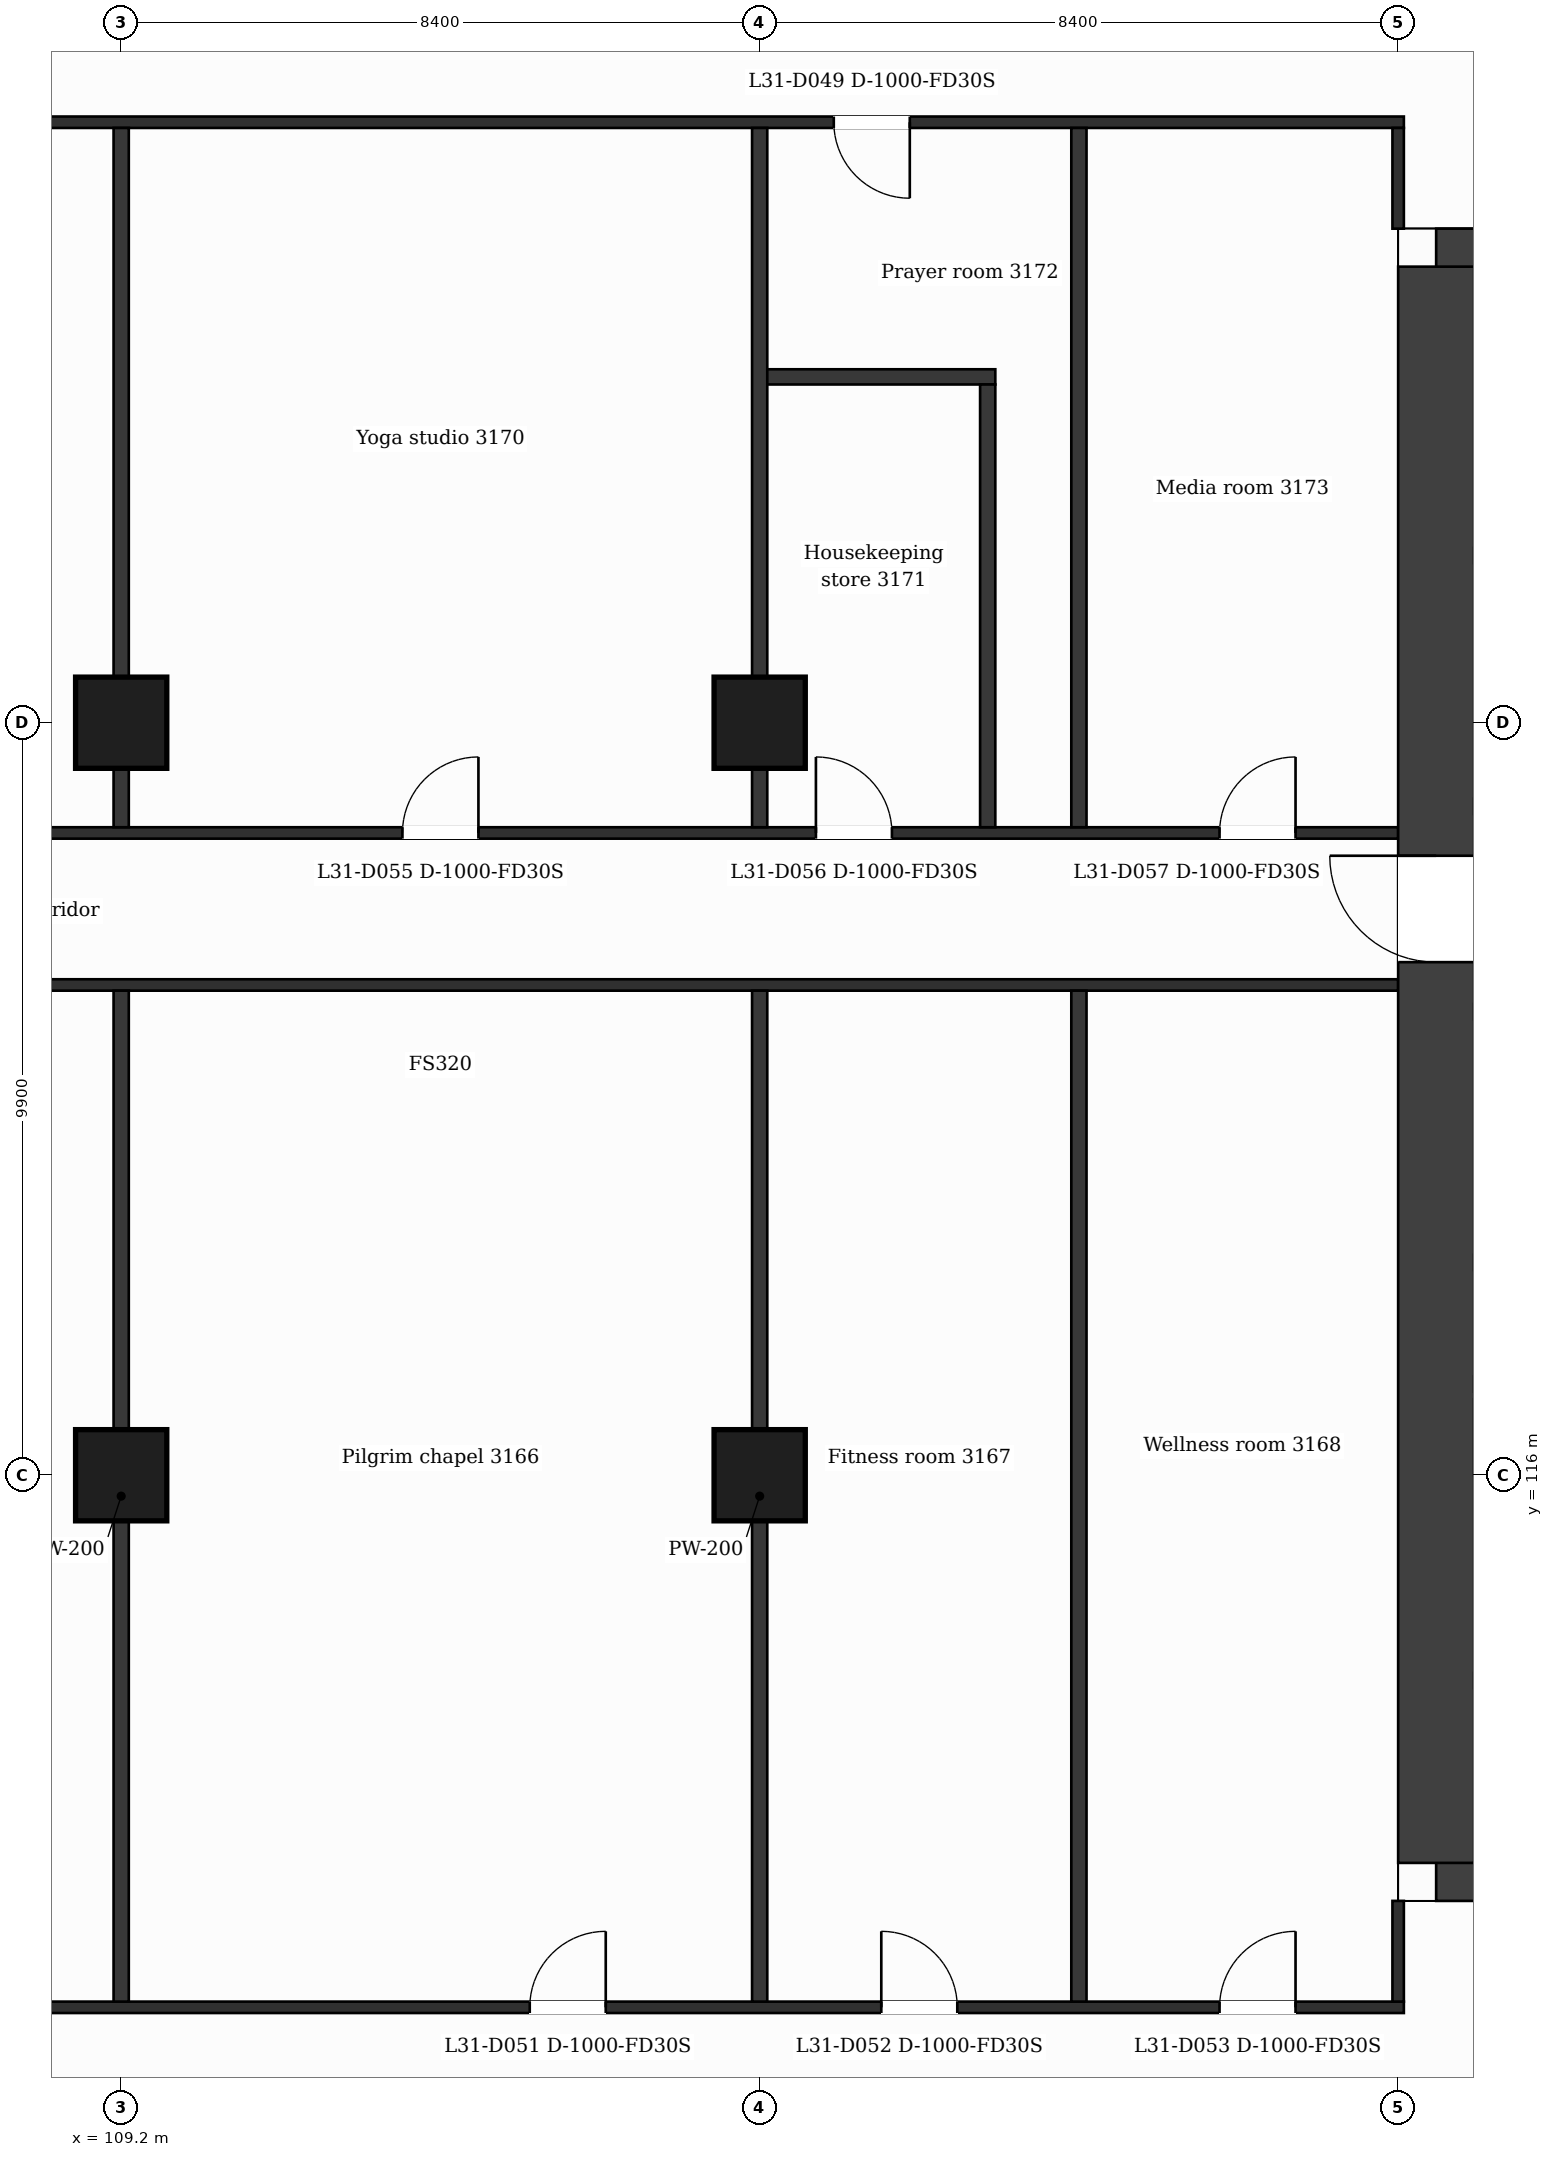
"""IFC4 building model, lengths in metres.
Left out: names, types, materials, properties, quantities, classifications, styles, units other than length and angle.
Written with IfcOpenShell. Run it as: python <this file> out.ifc"""

import sys

from ifc_helpers import new_model, si_unit, direction, frame, frame_2d, origin, origin_2d, place, context, subcontext, project, spatial, rectangle, extrude, element, fill, save


model = new_model("IFC4")
c1 = context("Model", 3, precision=1e-05, world=origin(), true_north=direction((0.0, 1.0)))
c2 = subcontext(c1, "Body", "Model", "MODEL_VIEW")
j1 = project(units=[si_unit("LENGTHUNIT", "METRE"), si_unit("PLANEANGLEUNIT", "RADIAN")], contexts=[c1])
p1 = place(None, origin())
s1 = spatial("IfcSite", under=j1, at=p1, CompositionType="ELEMENT")
p2 = place(p1, origin())
s2 = spatial("IfcBuilding", under=s1, at=p2, CompositionType="ELEMENT")
p3 = place(p2, frame((0.0, 0.0, 131.7)))
s3 = spatial("IfcBuildingStorey", under=s2, at=p3, CompositionType="ELEMENT", Elevation=131.7)
p4 = place(p3, frame((126.5, 131.9, 0.0), z_axis=(0.0, 0.0, 1.0), x_axis=(1.0, 0.0, 0.0)))
e1 = element("IfcWall", 1, at=p4, inside=s3, PredefinedType="SHEAR", context=c2, shape_type="SweptSolid", body=[
    extrude(rectangle(XDim=11.232, YDim=1.0, at=frame_2d((5.616, 0.0))), origin(), (0.0, 0.0, 1.0), 3.7),
])
p5 = place(p4, frame((3.386, 0.0, 0.0)))
e2 = element("IfcOpeningElement", 2, at=p5, cuts=e1, PredefinedType="OPENING", context=c2, shape_type="SweptSolid", body=[
    extrude(rectangle(XDim=1.2, YDim=2.1, at=frame_2d((0.6, 1.05))), frame((0.0, 0.51, 0.0), z_axis=(0.0, -1.0, 0.0), x_axis=(1.0, 0.0, 0.0)), (0.0, 0.0, 1.0), 1.02),
])
p6 = place(p3, frame((140.559, 110.9, 0.0), z_axis=(0.0, 0.0, 1.0), x_axis=(-1.0, 0.0, 0.0)))
e3 = element("IfcWall", 3, at=p6, inside=s3, PredefinedType="SHEAR", context=c2, shape_type="SweptSolid", body=[
    extrude(rectangle(XDim=14.059, YDim=1.0, at=frame_2d((7.029, 0.0))), origin(), (0.0, 0.0, 1.0), 3.7),
])
p7 = place(p6, frame((6.858, 0.0, 0.0)))
e4 = element("IfcOpeningElement", 4, at=p7, cuts=e3, PredefinedType="OPENING", context=c2, shape_type="SweptSolid", body=[
    extrude(rectangle(XDim=1.4, YDim=2.1, at=frame_2d((0.7, 1.05))), frame((0.0, 0.51, 0.0), z_axis=(0.0, -1.0, 0.0), x_axis=(1.0, 0.0, 0.0)), (0.0, 0.0, 1.0), 1.02),
])
p8 = place(p3, frame((126.5, 110.9, 0.0), z_axis=(0.0, 0.0, 1.0), x_axis=(0.0, 1.0, 0.0)))
e5 = element("IfcWall", 5, at=p8, inside=s3, PredefinedType="SHEAR", context=c2, shape_type="SweptSolid", body=[
    extrude(rectangle(XDim=21.0, YDim=1.0, at=frame_2d((10.5, 0.0))), origin(), (0.0, 0.0, 1.0), 3.7),
])
p9 = place(p8, frame((11.85, 0.0, 0.0)))
e6 = element("IfcOpeningElement", 6, at=p9, cuts=e5, PredefinedType="OPENING", context=c2, shape_type="SweptSolid", body=[
    extrude(rectangle(XDim=1.4, YDim=2.1, at=frame_2d((0.7, 1.05))), frame((0.0, 0.51, 0.0), z_axis=(0.0, -1.0, 0.0), x_axis=(1.0, 0.0, 0.0)), (0.0, 0.0, 1.0), 1.02),
])
for number, where, z_axis, x_axis in (
    (7, (109.2, 116.0, 0.0), (0.0, 0.0, 1.0), (1.0, 0.0, 0.0)),
    (8, (117.6, 116.0, 0.0), (0.0, 0.0, 1.0), (1.0, 0.0, 0.0)),
    (9, (109.2, 125.9, 0.0), (0.0, 0.0, 1.0), (1.0, 0.0, 0.0)),
    (10, (117.6, 125.9, 0.0), (0.0, 0.0, 1.0), (1.0, 0.0, 0.0)),
):
    element("IfcColumn", number, at=place(p3, frame(where, z_axis=z_axis, x_axis=x_axis)), inside=s3, PredefinedType="COLUMN", context=c2, shape_type="SweptSolid", body=[
        extrude(rectangle(XDim=1.2, YDim=1.2, at=origin_2d()), origin(), (0.0, 0.0, 1.0), 3.7),
    ])
p10 = place(p3, frame((100.725, 109.0, 0.0), z_axis=(0.0, 0.0, 1.0), x_axis=(1.0, 0.0, 0.0)))
e11 = element("IfcWall", 11, at=p10, inside=s3, PredefinedType="PARTITIONING", context=c2, shape_type="SweptSolid", body=[
    extrude(rectangle(XDim=25.35, YDim=0.15, at=frame_2d((12.675, 0.0))), origin(), (0.0, 0.0, 1.0), 3.2),
])
p11 = place(p10, frame((3.105, 0.0, 0.0)))
e12 = element("IfcOpeningElement", 12, at=p11, cuts=e11, PredefinedType="OPENING", context=c2, shape_type="SweptSolid", body=[
    extrude(rectangle(XDim=1.0, YDim=2.1, at=frame_2d((0.5, 1.05))), frame((0.0, 0.085, 0.0), z_axis=(0.0, -1.0, 0.0), x_axis=(1.0, 0.0, 0.0)), (0.0, 0.0, 1.0), 0.17),
])
p12 = place(p10, frame((13.85, 0.0, 0.0)))
e13 = element("IfcOpeningElement", 13, at=p12, cuts=e11, PredefinedType="OPENING", context=c2, shape_type="SweptSolid", body=[
    extrude(rectangle(XDim=1.0, YDim=2.1, at=frame_2d((0.5, 1.05))), frame((0.0, 0.085, 0.0), z_axis=(0.0, -1.0, 0.0), x_axis=(1.0, 0.0, 0.0)), (0.0, 0.0, 1.0), 0.17),
])
p13 = place(p10, frame((18.475, 0.0, 0.0)))
e14 = element("IfcOpeningElement", 14, at=p13, cuts=e11, PredefinedType="OPENING", context=c2, shape_type="SweptSolid", body=[
    extrude(rectangle(XDim=1.0, YDim=2.1, at=frame_2d((0.5, 1.05))), frame((0.0, 0.085, 0.0), z_axis=(0.0, -1.0, 0.0), x_axis=(1.0, 0.0, 0.0)), (0.0, 0.0, 1.0), 0.17),
])
p14 = place(p10, frame((22.925, 0.0, 0.0)))
e15 = element("IfcOpeningElement", 15, at=p14, cuts=e11, PredefinedType="OPENING", context=c2, shape_type="SweptSolid", body=[
    extrude(rectangle(XDim=1.0, YDim=2.1, at=frame_2d((0.5, 1.05))), frame((0.0, 0.085, 0.0), z_axis=(0.0, -1.0, 0.0), x_axis=(1.0, 0.0, 0.0)), (0.0, 0.0, 1.0), 0.17),
])
p15 = place(p3, frame((127.0, 113.3, 0.0), z_axis=(0.0, 0.0, 1.0), x_axis=(1.0, 0.0, 0.0)))
e16 = element("IfcWall", 16, at=p15, inside=s3, PredefinedType="PARTITIONING", context=c2, shape_type="SweptSolid", body=[
    extrude(rectangle(XDim=4.673, YDim=0.2, at=frame_2d((2.336, 0.0))), origin(), (0.0, 0.0, 1.0), 3.2),
])
p16 = place(p15, frame((0.642, 0.0, 0.0)))
e17 = element("IfcOpeningElement", 17, at=p16, cuts=e16, PredefinedType="OPENING", context=c2, shape_type="SweptSolid", body=[
    extrude(rectangle(XDim=1.1, YDim=2.1, at=frame_2d((0.55, 1.05))), frame((0.0, 0.11, 0.0), z_axis=(0.0, -1.0, 0.0), x_axis=(1.0, 0.0, 0.0)), (0.0, 0.0, 1.0), 0.22),
])
p17 = place(p3, frame((100.8, 122.45, 0.0), z_axis=(0.0, 0.0, 1.0), x_axis=(1.0, 0.0, 0.0)))
e18 = element("IfcWall", 18, at=p17, inside=s3, PredefinedType="PARTITIONING", context=c2, shape_type="SweptSolid", body=[
    extrude(rectangle(XDim=25.2, YDim=0.15, at=frame_2d((12.6, 0.0))), origin(), (0.0, 0.0, 1.0), 3.2),
])
p18 = place(p3, frame((100.8, 124.45, 0.0), z_axis=(0.0, 0.0, 1.0), x_axis=(1.0, 0.0, 0.0)))
e19 = element("IfcWall", 19, at=p18, inside=s3, PredefinedType="PARTITIONING", context=c2, shape_type="SweptSolid", body=[
    extrude(rectangle(XDim=25.2, YDim=0.15, at=frame_2d((12.6, 0.0))), origin(), (0.0, 0.0, 1.0), 3.2),
])
p19 = place(p18, frame((2.025, 0.0, 0.0)))
e20 = element("IfcOpeningElement", 20, at=p19, cuts=e19, PredefinedType="OPENING", context=c2, shape_type="SweptSolid", body=[
    extrude(rectangle(XDim=1.0, YDim=2.1, at=frame_2d((0.5, 1.05))), frame((0.0, 0.085, 0.0), z_axis=(0.0, -1.0, 0.0), x_axis=(1.0, 0.0, 0.0)), (0.0, 0.0, 1.0), 0.17),
])
p20 = place(p18, frame((12.1, 0.0, 0.0)))
e21 = element("IfcOpeningElement", 21, at=p20, cuts=e19, PredefinedType="OPENING", context=c2, shape_type="SweptSolid", body=[
    extrude(rectangle(XDim=1.0, YDim=2.1, at=frame_2d((0.5, 1.05))), frame((0.0, 0.085, 0.0), z_axis=(0.0, -1.0, 0.0), x_axis=(1.0, 0.0, 0.0)), (0.0, 0.0, 1.0), 0.17),
])
p21 = place(p18, frame((17.54, 0.0, 0.0)))
e22 = element("IfcOpeningElement", 22, at=p21, cuts=e19, PredefinedType="OPENING", context=c2, shape_type="SweptSolid", body=[
    extrude(rectangle(XDim=1.0, YDim=2.1, at=frame_2d((0.5, 1.05))), frame((0.0, 0.085, 0.0), z_axis=(0.0, -1.0, 0.0), x_axis=(1.0, 0.0, 0.0)), (0.0, 0.0, 1.0), 0.17),
])
p22 = place(p18, frame((22.85, 0.0, 0.0)))
e23 = element("IfcOpeningElement", 23, at=p22, cuts=e19, PredefinedType="OPENING", context=c2, shape_type="SweptSolid", body=[
    extrude(rectangle(XDim=1.0, YDim=2.1, at=frame_2d((0.5, 1.05))), frame((0.0, 0.085, 0.0), z_axis=(0.0, -1.0, 0.0), x_axis=(1.0, 0.0, 0.0)), (0.0, 0.0, 1.0), 0.17),
])
p23 = place(p3, frame((127.0, 124.8, 0.0), z_axis=(0.0, 0.0, 1.0), x_axis=(1.0, 0.0, 0.0)))
e24 = element("IfcWall", 24, at=p23, inside=s3, PredefinedType="PARTITIONING", context=c2, shape_type="SweptSolid", body=[
    extrude(rectangle(XDim=4.649, YDim=0.2, at=frame_2d((2.324, 0.0))), origin(), (0.0, 0.0, 1.0), 3.2),
])
p24 = place(p23, frame((0.665, 0.0, 0.0)))
e25 = element("IfcOpeningElement", 25, at=p24, cuts=e24, PredefinedType="OPENING", context=c2, shape_type="SweptSolid", body=[
    extrude(rectangle(XDim=1.1, YDim=2.1, at=frame_2d((0.55, 1.05))), frame((0.0, 0.11, 0.0), z_axis=(0.0, -1.0, 0.0), x_axis=(1.0, 0.0, 0.0)), (0.0, 0.0, 1.0), 0.22),
])
p25 = place(p3, frame((127.0, 128.1, 0.0), z_axis=(0.0, 0.0, 1.0), x_axis=(1.0, 0.0, 0.0)))
e26 = element("IfcWall", 26, at=p25, inside=s3, PredefinedType="PARTITIONING", context=c2, shape_type="SweptSolid", body=[
    extrude(rectangle(XDim=4.649, YDim=0.2, at=frame_2d((2.324, 0.0))), origin(), (0.0, 0.0, 1.0), 3.2),
])
p26 = place(p25, frame((2.884, 0.0, 0.0)))
e27 = element("IfcOpeningElement", 27, at=p26, cuts=e26, PredefinedType="OPENING", context=c2, shape_type="SweptSolid", body=[
    extrude(rectangle(XDim=1.1, YDim=2.1, at=frame_2d((0.55, 1.05))), frame((0.0, 0.11, 0.0), z_axis=(0.0, -1.0, 0.0), x_axis=(1.0, 0.0, 0.0)), (0.0, 0.0, 1.0), 0.22),
])
p27 = place(p3, frame((117.6, 130.45, 0.0), z_axis=(0.0, 0.0, 1.0), x_axis=(1.0, 0.0, 0.0)))
e28 = element("IfcWall", 28, at=p27, inside=s3, PredefinedType="PARTITIONING", context=c2, shape_type="SweptSolid", body=[
    extrude(rectangle(XDim=3.1, YDim=0.2, at=frame_2d((1.55, 0.0))), origin(), (0.0, 0.0, 1.0), 3.2),
])
p28 = place(p3, frame((100.725, 133.8, 0.0), z_axis=(0.0, 0.0, 1.0), x_axis=(1.0, 0.0, 0.0)))
e29 = element("IfcWall", 29, at=p28, inside=s3, PredefinedType="PARTITIONING", context=c2, shape_type="SweptSolid", body=[
    extrude(rectangle(XDim=25.35, YDim=0.15, at=frame_2d((12.675, 0.0))), origin(), (0.0, 0.0, 1.0), 3.2),
])
p29 = place(p28, frame((17.85, 0.0, 0.0)))
e30 = element("IfcOpeningElement", 30, at=p29, cuts=e29, PredefinedType="OPENING", context=c2, shape_type="SweptSolid", body=[
    extrude(rectangle(XDim=1.0, YDim=2.1, at=frame_2d((0.5, 1.05))), frame((0.0, 0.085, 0.0), z_axis=(0.0, -1.0, 0.0), x_axis=(1.0, 0.0, 0.0)), (0.0, 0.0, 1.0), 0.17),
])
p30 = place(p3, frame((109.2, 109.075, 0.0), z_axis=(0.0, 0.0, 1.0), x_axis=(0.0, 1.0, 0.0)))
e31 = element("IfcWall", 31, at=p30, inside=s3, PredefinedType="PARTITIONING", context=c2, shape_type="SweptSolid", body=[
    extrude(rectangle(XDim=13.3, YDim=0.2, at=frame_2d((6.65, 0.0))), origin(), (0.0, 0.0, 1.0), 3.2),
])
p31 = place(p3, frame((109.2, 124.525, 0.0), z_axis=(0.0, 0.0, 1.0), x_axis=(0.0, 1.0, 0.0)))
e32 = element("IfcWall", 32, at=p31, inside=s3, PredefinedType="PARTITIONING", context=c2, shape_type="SweptSolid", body=[
    extrude(rectangle(XDim=9.2, YDim=0.2, at=frame_2d((4.6, 0.0))), origin(), (0.0, 0.0, 1.0), 3.2),
])
p32 = place(p3, frame((117.6, 109.075, 0.0), z_axis=(0.0, 0.0, 1.0), x_axis=(0.0, 1.0, 0.0)))
e33 = element("IfcWall", 33, at=p32, inside=s3, PredefinedType="PARTITIONING", context=c2, shape_type="SweptSolid", body=[
    extrude(rectangle(XDim=13.3, YDim=0.2, at=frame_2d((6.65, 0.0))), origin(), (0.0, 0.0, 1.0), 3.2),
])
p33 = place(p3, frame((117.6, 124.525, 0.0), z_axis=(0.0, 0.0, 1.0), x_axis=(0.0, 1.0, 0.0)))
e34 = element("IfcWall", 34, at=p33, inside=s3, PredefinedType="PARTITIONING", context=c2, shape_type="SweptSolid", body=[
    extrude(rectangle(XDim=9.2, YDim=0.2, at=frame_2d((4.6, 0.0))), origin(), (0.0, 0.0, 1.0), 3.2),
])
p34 = place(p3, frame((120.6, 124.525, 0.0), z_axis=(0.0, 0.0, 1.0), x_axis=(0.0, 1.0, 0.0)))
e35 = element("IfcWall", 35, at=p34, inside=s3, PredefinedType="PARTITIONING", context=c2, shape_type="SweptSolid", body=[
    extrude(rectangle(XDim=5.825, YDim=0.2, at=frame_2d((2.913, 0.0))), origin(), (0.0, 0.0, 1.0), 3.2),
])
p35 = place(p3, frame((121.8, 109.075, 0.0), z_axis=(0.0, 0.0, 1.0), x_axis=(0.0, 1.0, 0.0)))
e36 = element("IfcWall", 36, at=p35, inside=s3, PredefinedType="PARTITIONING", context=c2, shape_type="SweptSolid", body=[
    extrude(rectangle(XDim=13.3, YDim=0.2, at=frame_2d((6.65, 0.0))), origin(), (0.0, 0.0, 1.0), 3.2),
])
p36 = place(p3, frame((121.8, 124.525, 0.0), z_axis=(0.0, 0.0, 1.0), x_axis=(0.0, 1.0, 0.0)))
e37 = element("IfcWall", 37, at=p36, inside=s3, PredefinedType="PARTITIONING", context=c2, shape_type="SweptSolid", body=[
    extrude(rectangle(XDim=9.2, YDim=0.2, at=frame_2d((4.6, 0.0))), origin(), (0.0, 0.0, 1.0), 3.2),
])
p37 = place(p3, frame((126.0, 109.075, 0.0), z_axis=(0.0, 0.0, 1.0), x_axis=(0.0, 1.0, 0.0)))
e38 = element("IfcWall", 38, at=p37, inside=s3, PredefinedType="PARTITIONING", context=c2, shape_type="SweptSolid", body=[
    extrude(rectangle(XDim=1.325, YDim=0.15, at=frame_2d((0.663, 0.0))), origin(), (0.0, 0.0, 1.0), 3.2),
])
p38 = place(p3, frame((126.0, 132.4, 0.0), z_axis=(0.0, 0.0, 1.0), x_axis=(0.0, 1.0, 0.0)))
e39 = element("IfcWall", 39, at=p38, inside=s3, PredefinedType="PARTITIONING", context=c2, shape_type="SweptSolid", body=[
    extrude(rectangle(XDim=1.325, YDim=0.15, at=frame_2d((0.663, 0.0))), origin(), (0.0, 0.0, 1.0), 3.2),
])
p39 = place(p29, origin())
e40 = element("IfcDoor", 40, at=p39, inside=s3, OperationType="SINGLE_SWING_RIGHT", PredefinedType="DOOR", context=c2, shape_type="SweptSolid", body=[
    extrude(rectangle(XDim=1.0, YDim=2.1, at=frame_2d((0.5, 1.05))), frame((0.0, 0.025, 0.0), z_axis=(0.0, -1.0, 0.0), x_axis=(1.0, 0.0, 0.0)), (0.0, 0.0, 1.0), 0.05),
])
fill(e30, e40)
p40 = place(p12, origin())
e41 = element("IfcDoor", 41, at=p40, inside=s3, OperationType="SINGLE_SWING_RIGHT", PredefinedType="DOOR", context=c2, shape_type="SweptSolid", body=[
    extrude(rectangle(XDim=1.0, YDim=2.1, at=frame_2d((0.5, 1.05))), frame((0.0, 0.025, 0.0), z_axis=(0.0, -1.0, 0.0), x_axis=(1.0, 0.0, 0.0)), (0.0, 0.0, 1.0), 0.05),
])
fill(e13, e41)
p41 = place(p13, origin())
e42 = element("IfcDoor", 42, at=p41, inside=s3, OperationType="SINGLE_SWING_LEFT", PredefinedType="DOOR", context=c2, shape_type="SweptSolid", body=[
    extrude(rectangle(XDim=1.0, YDim=2.1, at=frame_2d((0.5, 1.05))), frame((0.0, 0.025, 0.0), z_axis=(0.0, -1.0, 0.0), x_axis=(1.0, 0.0, 0.0)), (0.0, 0.0, 1.0), 0.05),
])
fill(e14, e42)
p42 = place(p14, origin())
e43 = element("IfcDoor", 43, at=p42, inside=s3, OperationType="SINGLE_SWING_RIGHT", PredefinedType="DOOR", context=c2, shape_type="SweptSolid", body=[
    extrude(rectangle(XDim=1.0, YDim=2.1, at=frame_2d((0.5, 1.05))), frame((0.0, 0.025, 0.0), z_axis=(0.0, -1.0, 0.0), x_axis=(1.0, 0.0, 0.0)), (0.0, 0.0, 1.0), 0.05),
])
fill(e15, e43)
p43 = place(p20, origin())
e44 = element("IfcDoor", 44, at=p43, inside=s3, OperationType="SINGLE_SWING_RIGHT", PredefinedType="DOOR", context=c2, shape_type="SweptSolid", body=[
    extrude(rectangle(XDim=1.0, YDim=2.1, at=frame_2d((0.5, 1.05))), frame((0.0, 0.025, 0.0), z_axis=(0.0, -1.0, 0.0), x_axis=(1.0, 0.0, 0.0)), (0.0, 0.0, 1.0), 0.05),
])
fill(e21, e44)
p44 = place(p21, origin())
e45 = element("IfcDoor", 45, at=p44, inside=s3, OperationType="SINGLE_SWING_LEFT", PredefinedType="DOOR", context=c2, shape_type="SweptSolid", body=[
    extrude(rectangle(XDim=1.0, YDim=2.1, at=frame_2d((0.5, 1.05))), frame((0.0, 0.025, 0.0), z_axis=(0.0, -1.0, 0.0), x_axis=(1.0, 0.0, 0.0)), (0.0, 0.0, 1.0), 0.05),
])
fill(e22, e45)
p45 = place(p22, origin())
e46 = element("IfcDoor", 46, at=p45, inside=s3, OperationType="SINGLE_SWING_RIGHT", PredefinedType="DOOR", context=c2, shape_type="SweptSolid", body=[
    extrude(rectangle(XDim=1.0, YDim=2.1, at=frame_2d((0.5, 1.05))), frame((0.0, 0.025, 0.0), z_axis=(0.0, -1.0, 0.0), x_axis=(1.0, 0.0, 0.0)), (0.0, 0.0, 1.0), 0.05),
])
fill(e23, e46)
p46 = place(p9, origin())
e47 = element("IfcDoor", 47, at=p46, inside=s3, OperationType="SINGLE_SWING_RIGHT", PredefinedType="DOOR", context=c2, shape_type="SweptSolid", body=[
    extrude(rectangle(XDim=1.4, YDim=2.1, at=frame_2d((0.7, 1.05))), frame((0.0, 0.025, 0.0), z_axis=(0.0, -1.0, 0.0), x_axis=(1.0, 0.0, 0.0)), (0.0, 0.0, 1.0), 0.05),
])
fill(e6, e47)
save(model, sys.argv[1])
